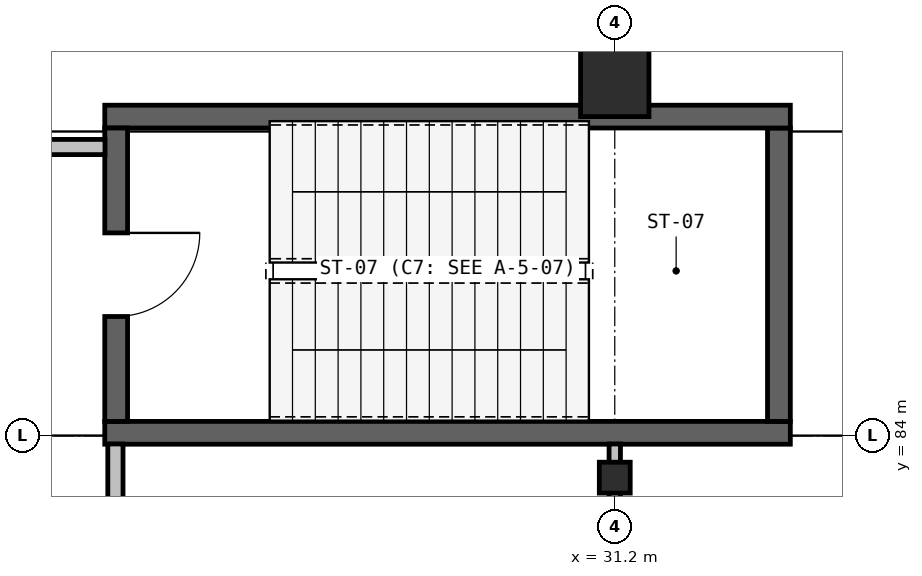
"""IFC4 building model, lengths in metres.
Left out: names, types, materials, properties, quantities, classifications, styles, units other than length and angle.
Written with IfcOpenShell. Run it as: python <this file> out.ifc"""

import sys

from ifc_helpers import new_model, si_unit, direction, frame, frame_2d, origin, origin_2d, place, context, subcontext, project, spatial, rectangle, hollow_circle, extrude, element, fill, save


model = new_model("IFC4")
c1 = context("Model", 3, precision=1e-05, world=origin(), true_north=direction((0.0, 1.0)))
c2 = subcontext(c1, "Body", "Model", "MODEL_VIEW")
j1 = project(units=[si_unit("LENGTHUNIT", "METRE"), si_unit("PLANEANGLEUNIT", "RADIAN")], contexts=[c1])
p1 = place(None, origin())
s1 = spatial("IfcSite", under=j1, at=p1, CompositionType="ELEMENT")
p2 = place(p1, origin())
s2 = spatial("IfcBuilding", under=s1, at=p2, CompositionType="ELEMENT")
p3 = place(p2, origin())
s3 = spatial("IfcBuildingStorey", under=s2, at=p3, CompositionType="ELEMENT", Elevation=0.0)
p4 = place(p3, frame((31.2, 83.45, 0.0), z_axis=(0.0, 0.0, 1.0), x_axis=(1.0, 0.0, 0.0)))
e1 = element("IfcColumn", 1, at=p4, inside=s3, PredefinedType="COLUMN", context=c2, shape_type="SweptSolid", body=[
    extrude(hollow_circle(Radius=0.203, WallThickness=0.016, at=origin_2d()), origin(), (0.0, 0.0, 1.0), 5.4),
])
p5 = place(p3, frame((31.2, 88.65, 0.0), z_axis=(0.0, 0.0, 1.0), x_axis=(1.0, 0.0, 0.0)))
e2 = element("IfcColumn", 2, at=p5, inside=s3, PredefinedType="COLUMN", context=c2, shape_type="SweptSolid", body=[
    extrude(rectangle(XDim=0.9, YDim=0.9, at=origin_2d()), origin(), (0.0, 0.0, 1.0), 5.4),
])
p6 = place(p3, frame((24.49, 84.04, 0.0), z_axis=(0.0, 0.0, 1.0), x_axis=(1.0, 0.0, 0.0)))
e3 = element("IfcWall", 3, at=p6, inside=s3, PredefinedType="SHEAR", context=c2, shape_type="SweptSolid", body=[
    extrude(rectangle(XDim=9.02, YDim=0.3, at=frame_2d((4.51, 0.0))), origin(), (0.0, 0.0, 1.0), 5.08),
])
p7 = place(p3, frame((33.36, 84.19, 0.0), z_axis=(0.0, 0.0, 1.0), x_axis=(0.0, 1.0, 0.0)))
e4 = element("IfcWall", 4, at=p7, inside=s3, PredefinedType="SHEAR", context=c2, shape_type="SweptSolid", body=[
    extrude(rectangle(XDim=3.86, YDim=0.3, at=frame_2d((1.93, 0.0))), origin(), (0.0, 0.0, 1.0), 5.08),
])
p8 = place(p3, frame((33.51, 88.2, 0.0), z_axis=(0.0, 0.0, 1.0), x_axis=(-1.0, 0.0, 0.0)))
e5 = element("IfcWall", 5, at=p8, inside=s3, PredefinedType="SHEAR", context=c2, shape_type="SweptSolid", body=[
    extrude(rectangle(XDim=9.02, YDim=0.3, at=frame_2d((4.51, 0.0))), origin(), (0.0, 0.0, 1.0), 5.08),
])
p9 = place(p3, frame((24.64, 88.05, 0.0), z_axis=(0.0, 0.0, 1.0), x_axis=(0.0, -1.0, 0.0)))
e6 = element("IfcWall", 6, at=p9, inside=s3, PredefinedType="SHEAR", context=c2, shape_type="SweptSolid", body=[
    extrude(rectangle(XDim=3.86, YDim=0.3, at=frame_2d((1.93, 0.0))), origin(), (0.0, 0.0, 1.0), 5.08),
])
p10 = place(p9, frame((1.38, 0.0, 0.0)))
e7 = element("IfcOpeningElement", 7, at=p10, cuts=e6, PredefinedType="OPENING", context=c2, shape_type="SweptSolid", body=[
    extrude(rectangle(XDim=1.1, YDim=2.15, at=frame_2d((0.55, 1.075))), frame((0.0, 0.16, 0.0), z_axis=(0.0, -1.0, 0.0), x_axis=(1.0, 0.0, 0.0)), (0.0, 0.0, 1.0), 0.32),
])
p11 = place(p3, frame((14.547, 87.8, 0.0), z_axis=(0.0, 0.0, 1.0), x_axis=(1.0, 0.0, 0.0)))
e8 = element("IfcWall", 8, at=p11, inside=s3, PredefinedType="SOLIDWALL", context=c2, shape_type="SweptSolid", body=[
    extrude(rectangle(XDim=9.946, YDim=0.2, at=frame_2d((4.973, 0.0))), origin(), (0.0, 0.0, 1.0), 5.08),
])
p12 = place(p3, frame((24.63, 83.893, 0.0), z_axis=(0.0, 0.0, 1.0), x_axis=(0.0, -1.0, 0.0)))
e9 = element("IfcWall", 9, at=p12, inside=s3, PredefinedType="SOLIDWALL", context=c2, shape_type="SweptSolid", body=[
    extrude(rectangle(XDim=4.293, YDim=0.2, at=frame_2d((2.146, 0.0))), origin(), (0.0, 0.0, 1.0), 5.08),
])
p13 = place(p3, frame((31.2, 83.893, 0.0), z_axis=(0.0, 0.0, 1.0), x_axis=(0.0, -1.0, 0.0)))
e10 = element("IfcWall", 10, at=p13, inside=s3, PredefinedType="PARTITIONING", context=c2, shape_type="SweptSolid", body=[
    extrude(rectangle(XDim=4.333, YDim=0.15, at=frame_2d((2.167, 0.0))), origin(), (0.0, 0.0, 1.0), 4.33),
])
p14 = place(p3, frame((31.2, 88.347, 0.0), z_axis=(0.0, 0.0, 1.0), x_axis=(0.0, 1.0, 0.0)))
e11 = element("IfcWall", 11, at=p14, inside=s3, PredefinedType="PARTITIONING", context=c2, shape_type="SweptSolid", body=[
    extrude(rectangle(XDim=3.653, YDim=0.165, at=frame_2d((1.827, 0.0))), origin(), (0.0, 0.0, 1.0), 5.08),
])
p15 = place(p10, origin())
e12 = element("IfcDoor", 12, at=p15, inside=s3, OperationType="SINGLE_SWING_LEFT", PredefinedType="DOOR", context=c2, shape_type="SweptSolid", body=[
    extrude(rectangle(XDim=1.1, YDim=2.15, at=frame_2d((0.55, 1.075))), frame((0.0, 0.025, 0.0), z_axis=(0.0, -1.0, 0.0), x_axis=(1.0, 0.0, 0.0)), (0.0, 0.0, 1.0), 0.05),
])
fill(e7, e12)
save(model, sys.argv[1])
